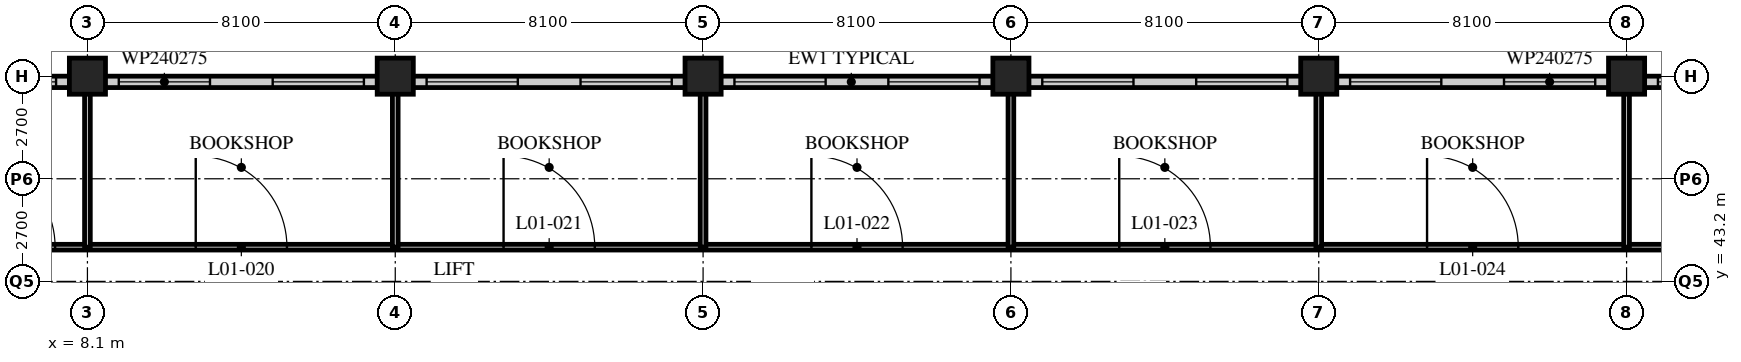
"""IFC4 building model, lengths in metres.
Left out: names, types, materials, properties, quantities, classifications, styles, units other than length and angle.
Written with IfcOpenShell. Run it as: python <this file> out.ifc"""

import sys

from ifc_helpers import new_model, si_unit, direction, frame, frame_2d, origin, origin_2d, place, context, subcontext, project, spatial, rectangle, hollow_rectangle, extrude, element, fill, save


model = new_model("IFC4")
c1 = context("Model", 3, precision=1e-05, world=origin(), true_north=direction((0.0, 1.0)))
c2 = subcontext(c1, "Body", "Model", "MODEL_VIEW")
j1 = project(units=[si_unit("LENGTHUNIT", "METRE"), si_unit("PLANEANGLEUNIT", "RADIAN")], contexts=[c1])
p1 = place(None, origin())
s1 = spatial("IfcSite", under=j1, at=p1, CompositionType="ELEMENT")
p2 = place(p1, origin())
s2 = spatial("IfcBuilding", under=s1, at=p2, CompositionType="ELEMENT")
p3 = place(p2, frame((0.0, 0.0, 6.0)))
s3 = spatial("IfcBuildingStorey", under=s2, at=p3, CompositionType="ELEMENT", Elevation=6.0)
for number, where, z_axis, x_axis in (
    (1, (8.1, 48.6, 0.0), (0.0, 0.0, 1.0), (1.0, 0.0, 0.0)),
    (2, (16.2, 48.6, 0.0), (0.0, 0.0, 1.0), (1.0, 0.0, 0.0)),
    (3, (24.3, 48.6, 0.0), (0.0, 0.0, 1.0), (1.0, 0.0, 0.0)),
    (4, (32.4, 48.6, 0.0), (0.0, 0.0, 1.0), (1.0, 0.0, 0.0)),
    (5, (40.5, 48.6, 0.0), (0.0, 0.0, 1.0), (1.0, 0.0, 0.0)),
    (6, (48.6, 48.6, 0.0), (0.0, 0.0, 1.0), (1.0, 0.0, 0.0)),
):
    element("IfcColumn", number, at=place(p3, frame(where, z_axis=z_axis, x_axis=x_axis)), inside=s3, PredefinedType="COLUMN", context=c2, shape_type="SweptSolid", body=[
        extrude(hollow_rectangle(XDim=0.95, YDim=0.95, WallThickness=0.1, at=origin_2d()), origin(), (0.0, 0.0, 1.0), 5.4),
    ])
p4 = place(p3, frame((64.5, 48.45, 0.0), z_axis=(0.0, 0.0, 1.0), x_axis=(-1.0, 0.0, 0.0)))
e7 = element("IfcWall", 7, at=p4, inside=s3, PredefinedType="SOLIDWALL", context=c2, shape_type="SweptSolid", body=[
    extrude(rectangle(XDim=72.6, YDim=0.3, at=frame_2d((36.3, 0.0))), origin(), (0.0, 0.0, 1.0), 5.15),
])
p5 = place(p4, frame((0.525, 0.0, 1.0)))
e8 = element("IfcOpeningElement", 8, at=p5, cuts=e7, PredefinedType="OPENING", context=c2, shape_type="SweptSolid", body=[
    extrude(rectangle(XDim=2.4, YDim=2.75, at=frame_2d((1.2, 1.375))), frame((0.0, 0.16, 0.0), z_axis=(0.0, -1.0, 0.0), x_axis=(1.0, 0.0, 0.0)), (0.0, 0.0, 1.0), 0.32),
])
p6 = place(p4, frame((4.575, 0.0, 1.0)))
e9 = element("IfcOpeningElement", 9, at=p6, cuts=e7, PredefinedType="OPENING", context=c2, shape_type="SweptSolid", body=[
    extrude(rectangle(XDim=2.4, YDim=2.75, at=frame_2d((1.2, 1.375))), frame((0.0, 0.16, 0.0), z_axis=(0.0, -1.0, 0.0), x_axis=(1.0, 0.0, 0.0)), (0.0, 0.0, 1.0), 0.32),
])
p7 = place(p4, frame((8.625, 0.0, 1.0)))
e10 = element("IfcOpeningElement", 10, at=p7, cuts=e7, PredefinedType="OPENING", context=c2, shape_type="SweptSolid", body=[
    extrude(rectangle(XDim=2.4, YDim=2.75, at=frame_2d((1.2, 1.375))), frame((0.0, 0.16, 0.0), z_axis=(0.0, -1.0, 0.0), x_axis=(1.0, 0.0, 0.0)), (0.0, 0.0, 1.0), 0.32),
])
p8 = place(p4, frame((12.675, 0.0, 1.0)))
e11 = element("IfcOpeningElement", 11, at=p8, cuts=e7, PredefinedType="OPENING", context=c2, shape_type="SweptSolid", body=[
    extrude(rectangle(XDim=2.4, YDim=2.75, at=frame_2d((1.2, 1.375))), frame((0.0, 0.16, 0.0), z_axis=(0.0, -1.0, 0.0), x_axis=(1.0, 0.0, 0.0)), (0.0, 0.0, 1.0), 0.32),
])
p9 = place(p4, frame((16.725, 0.0, 1.0)))
e12 = element("IfcOpeningElement", 12, at=p9, cuts=e7, PredefinedType="OPENING", context=c2, shape_type="SweptSolid", body=[
    extrude(rectangle(XDim=2.4, YDim=2.75, at=frame_2d((1.2, 1.375))), frame((0.0, 0.16, 0.0), z_axis=(0.0, -1.0, 0.0), x_axis=(1.0, 0.0, 0.0)), (0.0, 0.0, 1.0), 0.32),
])
p10 = place(p4, frame((20.775, 0.0, 1.0)))
e13 = element("IfcOpeningElement", 13, at=p10, cuts=e7, PredefinedType="OPENING", context=c2, shape_type="SweptSolid", body=[
    extrude(rectangle(XDim=2.4, YDim=2.75, at=frame_2d((1.2, 1.375))), frame((0.0, 0.16, 0.0), z_axis=(0.0, -1.0, 0.0), x_axis=(1.0, 0.0, 0.0)), (0.0, 0.0, 1.0), 0.32),
])
p11 = place(p4, frame((24.825, 0.0, 1.0)))
e14 = element("IfcOpeningElement", 14, at=p11, cuts=e7, PredefinedType="OPENING", context=c2, shape_type="SweptSolid", body=[
    extrude(rectangle(XDim=2.4, YDim=2.75, at=frame_2d((1.2, 1.375))), frame((0.0, 0.16, 0.0), z_axis=(0.0, -1.0, 0.0), x_axis=(1.0, 0.0, 0.0)), (0.0, 0.0, 1.0), 0.32),
])
p12 = place(p4, frame((28.875, 0.0, 1.0)))
e15 = element("IfcOpeningElement", 15, at=p12, cuts=e7, PredefinedType="OPENING", context=c2, shape_type="SweptSolid", body=[
    extrude(rectangle(XDim=2.4, YDim=2.75, at=frame_2d((1.2, 1.375))), frame((0.0, 0.16, 0.0), z_axis=(0.0, -1.0, 0.0), x_axis=(1.0, 0.0, 0.0)), (0.0, 0.0, 1.0), 0.32),
])
p13 = place(p4, frame((32.925, 0.0, 1.0)))
e16 = element("IfcOpeningElement", 16, at=p13, cuts=e7, PredefinedType="OPENING", context=c2, shape_type="SweptSolid", body=[
    extrude(rectangle(XDim=2.4, YDim=2.75, at=frame_2d((1.2, 1.375))), frame((0.0, 0.16, 0.0), z_axis=(0.0, -1.0, 0.0), x_axis=(1.0, 0.0, 0.0)), (0.0, 0.0, 1.0), 0.32),
])
p14 = place(p4, frame((36.975, 0.0, 1.0)))
e17 = element("IfcOpeningElement", 17, at=p14, cuts=e7, PredefinedType="OPENING", context=c2, shape_type="SweptSolid", body=[
    extrude(rectangle(XDim=2.4, YDim=2.75, at=frame_2d((1.2, 1.375))), frame((0.0, 0.16, 0.0), z_axis=(0.0, -1.0, 0.0), x_axis=(1.0, 0.0, 0.0)), (0.0, 0.0, 1.0), 0.32),
])
p15 = place(p4, frame((41.025, 0.0, 1.0)))
e18 = element("IfcOpeningElement", 18, at=p15, cuts=e7, PredefinedType="OPENING", context=c2, shape_type="SweptSolid", body=[
    extrude(rectangle(XDim=2.4, YDim=2.75, at=frame_2d((1.2, 1.375))), frame((0.0, 0.16, 0.0), z_axis=(0.0, -1.0, 0.0), x_axis=(1.0, 0.0, 0.0)), (0.0, 0.0, 1.0), 0.32),
])
p16 = place(p4, frame((45.075, 0.0, 1.0)))
e19 = element("IfcOpeningElement", 19, at=p16, cuts=e7, PredefinedType="OPENING", context=c2, shape_type="SweptSolid", body=[
    extrude(rectangle(XDim=2.4, YDim=2.75, at=frame_2d((1.2, 1.375))), frame((0.0, 0.16, 0.0), z_axis=(0.0, -1.0, 0.0), x_axis=(1.0, 0.0, 0.0)), (0.0, 0.0, 1.0), 0.32),
])
p17 = place(p4, frame((49.125, 0.0, 1.0)))
e20 = element("IfcOpeningElement", 20, at=p17, cuts=e7, PredefinedType="OPENING", context=c2, shape_type="SweptSolid", body=[
    extrude(rectangle(XDim=2.4, YDim=2.75, at=frame_2d((1.2, 1.375))), frame((0.0, 0.16, 0.0), z_axis=(0.0, -1.0, 0.0), x_axis=(1.0, 0.0, 0.0)), (0.0, 0.0, 1.0), 0.32),
])
p18 = place(p4, frame((53.175, 0.0, 1.0)))
e21 = element("IfcOpeningElement", 21, at=p18, cuts=e7, PredefinedType="OPENING", context=c2, shape_type="SweptSolid", body=[
    extrude(rectangle(XDim=2.4, YDim=2.75, at=frame_2d((1.2, 1.375))), frame((0.0, 0.16, 0.0), z_axis=(0.0, -1.0, 0.0), x_axis=(1.0, 0.0, 0.0)), (0.0, 0.0, 1.0), 0.32),
])
p19 = place(p4, frame((57.225, 0.0, 1.0)))
e22 = element("IfcOpeningElement", 22, at=p19, cuts=e7, PredefinedType="OPENING", context=c2, shape_type="SweptSolid", body=[
    extrude(rectangle(XDim=2.4, YDim=2.75, at=frame_2d((1.2, 1.375))), frame((0.0, 0.16, 0.0), z_axis=(0.0, -1.0, 0.0), x_axis=(1.0, 0.0, 0.0)), (0.0, 0.0, 1.0), 0.32),
])
p20 = place(p4, frame((61.275, 0.0, 1.0)))
e23 = element("IfcOpeningElement", 23, at=p20, cuts=e7, PredefinedType="OPENING", context=c2, shape_type="SweptSolid", body=[
    extrude(rectangle(XDim=2.4, YDim=2.75, at=frame_2d((1.2, 1.375))), frame((0.0, 0.16, 0.0), z_axis=(0.0, -1.0, 0.0), x_axis=(1.0, 0.0, 0.0)), (0.0, 0.0, 1.0), 0.32),
])
p21 = place(p4, frame((65.325, 0.0, 1.0)))
e24 = element("IfcOpeningElement", 24, at=p21, cuts=e7, PredefinedType="OPENING", context=c2, shape_type="SweptSolid", body=[
    extrude(rectangle(XDim=2.4, YDim=2.75, at=frame_2d((1.2, 1.375))), frame((0.0, 0.16, 0.0), z_axis=(0.0, -1.0, 0.0), x_axis=(1.0, 0.0, 0.0)), (0.0, 0.0, 1.0), 0.32),
])
p22 = place(p4, frame((69.375, 0.0, 1.0)))
e25 = element("IfcOpeningElement", 25, at=p22, cuts=e7, PredefinedType="OPENING", context=c2, shape_type="SweptSolid", body=[
    extrude(rectangle(XDim=2.4, YDim=2.75, at=frame_2d((1.2, 1.375))), frame((0.0, 0.16, 0.0), z_axis=(0.0, -1.0, 0.0), x_axis=(1.0, 0.0, 0.0)), (0.0, 0.0, 1.0), 0.32),
])
p23 = place(p3, frame((0.0, 44.1, 0.0), z_axis=(0.0, 0.0, 1.0), x_axis=(1.0, 0.0, 0.0)))
e26 = element("IfcWall", 26, at=p23, inside=s3, PredefinedType="PARTITIONING", context=c2, shape_type="SweptSolid", body=[
    extrude(rectangle(XDim=56.7, YDim=0.15, at=frame_2d((28.35, 0.0))), origin(), (0.0, 0.0, 1.0), 5.15),
])
p24 = place(p23, frame((10.95, 0.0, 0.0)))
e27 = element("IfcOpeningElement", 27, at=p24, cuts=e26, PredefinedType="OPENING", context=c2, shape_type="SweptSolid", body=[
    extrude(rectangle(XDim=2.4, YDim=2.7, at=frame_2d((1.2, 1.35))), frame((0.0, 0.085, 0.0), z_axis=(0.0, -1.0, 0.0), x_axis=(1.0, 0.0, 0.0)), (0.0, 0.0, 1.0), 0.17),
])
p25 = place(p23, frame((19.05, 0.0, 0.0)))
e28 = element("IfcOpeningElement", 28, at=p25, cuts=e26, PredefinedType="OPENING", context=c2, shape_type="SweptSolid", body=[
    extrude(rectangle(XDim=2.4, YDim=2.7, at=frame_2d((1.2, 1.35))), frame((0.0, 0.085, 0.0), z_axis=(0.0, -1.0, 0.0), x_axis=(1.0, 0.0, 0.0)), (0.0, 0.0, 1.0), 0.17),
])
p26 = place(p23, frame((27.15, 0.0, 0.0)))
e29 = element("IfcOpeningElement", 29, at=p26, cuts=e26, PredefinedType="OPENING", context=c2, shape_type="SweptSolid", body=[
    extrude(rectangle(XDim=2.4, YDim=2.7, at=frame_2d((1.2, 1.35))), frame((0.0, 0.085, 0.0), z_axis=(0.0, -1.0, 0.0), x_axis=(1.0, 0.0, 0.0)), (0.0, 0.0, 1.0), 0.17),
])
p27 = place(p23, frame((35.25, 0.0, 0.0)))
e30 = element("IfcOpeningElement", 30, at=p27, cuts=e26, PredefinedType="OPENING", context=c2, shape_type="SweptSolid", body=[
    extrude(rectangle(XDim=2.4, YDim=2.7, at=frame_2d((1.2, 1.35))), frame((0.0, 0.085, 0.0), z_axis=(0.0, -1.0, 0.0), x_axis=(1.0, 0.0, 0.0)), (0.0, 0.0, 1.0), 0.17),
])
p28 = place(p23, frame((43.35, 0.0, 0.0)))
e31 = element("IfcOpeningElement", 31, at=p28, cuts=e26, PredefinedType="OPENING", context=c2, shape_type="SweptSolid", body=[
    extrude(rectangle(XDim=2.4, YDim=2.7, at=frame_2d((1.2, 1.35))), frame((0.0, 0.085, 0.0), z_axis=(0.0, -1.0, 0.0), x_axis=(1.0, 0.0, 0.0)), (0.0, 0.0, 1.0), 0.17),
])
p29 = place(p23, frame((53.45, 0.0, 0.0)))
e32 = element("IfcOpeningElement", 32, at=p29, cuts=e26, PredefinedType="OPENING", context=c2, shape_type="SweptSolid", body=[
    extrude(rectangle(XDim=2.4, YDim=2.7, at=frame_2d((1.2, 1.35))), frame((0.0, 0.085, 0.0), z_axis=(0.0, -1.0, 0.0), x_axis=(1.0, 0.0, 0.0)), (0.0, 0.0, 1.0), 0.17),
])
p30 = place(p23, frame((4.85, 0.0, 0.0)))
e33 = element("IfcOpeningElement", 33, at=p30, cuts=e26, PredefinedType="OPENING", context=c2, shape_type="SweptSolid", body=[
    extrude(rectangle(XDim=2.4, YDim=2.7, at=frame_2d((1.2, 1.35))), frame((0.0, 0.085, 0.0), z_axis=(0.0, -1.0, 0.0), x_axis=(1.0, 0.0, 0.0)), (0.0, 0.0, 1.0), 0.17),
])
for number, where, z_axis, x_axis in (
    (34, (16.2, 44.1, 0.0), (0.0, 0.0, 1.0), (0.0, 1.0, 0.0)),
    (35, (24.3, 44.1, 0.0), (0.0, 0.0, 1.0), (0.0, 1.0, 0.0)),
    (36, (32.4, 44.1, 0.0), (0.0, 0.0, 1.0), (0.0, 1.0, 0.0)),
    (37, (40.5, 44.1, 0.0), (0.0, 0.0, 1.0), (0.0, 1.0, 0.0)),
    (38, (48.6, 44.1, 0.0), (0.0, 0.0, 1.0), (0.0, 1.0, 0.0)),
    (39, (8.1, 44.1, 0.0), (0.0, 0.0, 1.0), (0.0, 1.0, 0.0)),
):
    element("IfcWall", number, at=place(p3, frame(where, z_axis=z_axis, x_axis=x_axis)), inside=s3, PredefinedType="PARTITIONING", context=c2, shape_type="SweptSolid", body=[
        extrude(rectangle(XDim=4.2, YDim=0.15, at=frame_2d((2.1, 0.0))), origin(), (0.0, 0.0, 1.0), 4.538),
    ])
p31 = place(p8, origin())
e40 = element("IfcWindow", 40, at=p31, inside=s3, PartitioningType="SINGLE_PANEL", PredefinedType="WINDOW", context=c2, shape_type="SweptSolid", body=[
    extrude(rectangle(XDim=2.4, YDim=2.75, at=frame_2d((1.2, 1.375))), frame((0.0, 0.03, 0.0), z_axis=(0.0, -1.0, 0.0), x_axis=(1.0, 0.0, 0.0)), (0.0, 0.0, 1.0), 0.06),
])
fill(e11, e40)
p32 = place(p9, origin())
e41 = element("IfcWindow", 41, at=p32, inside=s3, PartitioningType="SINGLE_PANEL", PredefinedType="WINDOW", context=c2, shape_type="SweptSolid", body=[
    extrude(rectangle(XDim=2.4, YDim=2.75, at=frame_2d((1.2, 1.375))), frame((0.0, 0.03, 0.0), z_axis=(0.0, -1.0, 0.0), x_axis=(1.0, 0.0, 0.0)), (0.0, 0.0, 1.0), 0.06),
])
fill(e12, e41)
p33 = place(p10, origin())
e42 = element("IfcWindow", 42, at=p33, inside=s3, PartitioningType="SINGLE_PANEL", PredefinedType="WINDOW", context=c2, shape_type="SweptSolid", body=[
    extrude(rectangle(XDim=2.4, YDim=2.75, at=frame_2d((1.2, 1.375))), frame((0.0, 0.03, 0.0), z_axis=(0.0, -1.0, 0.0), x_axis=(1.0, 0.0, 0.0)), (0.0, 0.0, 1.0), 0.06),
])
fill(e13, e42)
p34 = place(p11, origin())
e43 = element("IfcWindow", 43, at=p34, inside=s3, PartitioningType="SINGLE_PANEL", PredefinedType="WINDOW", context=c2, shape_type="SweptSolid", body=[
    extrude(rectangle(XDim=2.4, YDim=2.75, at=frame_2d((1.2, 1.375))), frame((0.0, 0.03, 0.0), z_axis=(0.0, -1.0, 0.0), x_axis=(1.0, 0.0, 0.0)), (0.0, 0.0, 1.0), 0.06),
])
fill(e14, e43)
p35 = place(p12, origin())
e44 = element("IfcWindow", 44, at=p35, inside=s3, PartitioningType="SINGLE_PANEL", PredefinedType="WINDOW", context=c2, shape_type="SweptSolid", body=[
    extrude(rectangle(XDim=2.4, YDim=2.75, at=frame_2d((1.2, 1.375))), frame((0.0, 0.03, 0.0), z_axis=(0.0, -1.0, 0.0), x_axis=(1.0, 0.0, 0.0)), (0.0, 0.0, 1.0), 0.06),
])
fill(e15, e44)
p36 = place(p13, origin())
e45 = element("IfcWindow", 45, at=p36, inside=s3, PartitioningType="SINGLE_PANEL", PredefinedType="WINDOW", context=c2, shape_type="SweptSolid", body=[
    extrude(rectangle(XDim=2.4, YDim=2.75, at=frame_2d((1.2, 1.375))), frame((0.0, 0.03, 0.0), z_axis=(0.0, -1.0, 0.0), x_axis=(1.0, 0.0, 0.0)), (0.0, 0.0, 1.0), 0.06),
])
fill(e16, e45)
p37 = place(p14, origin())
e46 = element("IfcWindow", 46, at=p37, inside=s3, PartitioningType="SINGLE_PANEL", PredefinedType="WINDOW", context=c2, shape_type="SweptSolid", body=[
    extrude(rectangle(XDim=2.4, YDim=2.75, at=frame_2d((1.2, 1.375))), frame((0.0, 0.03, 0.0), z_axis=(0.0, -1.0, 0.0), x_axis=(1.0, 0.0, 0.0)), (0.0, 0.0, 1.0), 0.06),
])
fill(e17, e46)
p38 = place(p15, origin())
e47 = element("IfcWindow", 47, at=p38, inside=s3, PartitioningType="SINGLE_PANEL", PredefinedType="WINDOW", context=c2, shape_type="SweptSolid", body=[
    extrude(rectangle(XDim=2.4, YDim=2.75, at=frame_2d((1.2, 1.375))), frame((0.0, 0.03, 0.0), z_axis=(0.0, -1.0, 0.0), x_axis=(1.0, 0.0, 0.0)), (0.0, 0.0, 1.0), 0.06),
])
fill(e18, e47)
p39 = place(p16, origin())
e48 = element("IfcWindow", 48, at=p39, inside=s3, PartitioningType="SINGLE_PANEL", PredefinedType="WINDOW", context=c2, shape_type="SweptSolid", body=[
    extrude(rectangle(XDim=2.4, YDim=2.75, at=frame_2d((1.2, 1.375))), frame((0.0, 0.03, 0.0), z_axis=(0.0, -1.0, 0.0), x_axis=(1.0, 0.0, 0.0)), (0.0, 0.0, 1.0), 0.06),
])
fill(e19, e48)
p40 = place(p17, origin())
e49 = element("IfcWindow", 49, at=p40, inside=s3, PartitioningType="SINGLE_PANEL", PredefinedType="WINDOW", context=c2, shape_type="SweptSolid", body=[
    extrude(rectangle(XDim=2.4, YDim=2.75, at=frame_2d((1.2, 1.375))), frame((0.0, 0.03, 0.0), z_axis=(0.0, -1.0, 0.0), x_axis=(1.0, 0.0, 0.0)), (0.0, 0.0, 1.0), 0.06),
])
fill(e20, e49)
p41 = place(p18, origin())
e50 = element("IfcWindow", 50, at=p41, inside=s3, PartitioningType="SINGLE_PANEL", PredefinedType="WINDOW", context=c2, shape_type="SweptSolid", body=[
    extrude(rectangle(XDim=2.4, YDim=2.75, at=frame_2d((1.2, 1.375))), frame((0.0, 0.03, 0.0), z_axis=(0.0, -1.0, 0.0), x_axis=(1.0, 0.0, 0.0)), (0.0, 0.0, 1.0), 0.06),
])
fill(e21, e50)
p42 = place(p19, origin())
e51 = element("IfcWindow", 51, at=p42, inside=s3, PartitioningType="SINGLE_PANEL", PredefinedType="WINDOW", context=c2, shape_type="SweptSolid", body=[
    extrude(rectangle(XDim=2.4, YDim=2.75, at=frame_2d((1.2, 1.375))), frame((0.0, 0.03, 0.0), z_axis=(0.0, -1.0, 0.0), x_axis=(1.0, 0.0, 0.0)), (0.0, 0.0, 1.0), 0.06),
])
fill(e22, e51)
p43 = place(p24, origin())
e52 = element("IfcDoor", 52, at=p43, inside=s3, OperationType="DOUBLE_DOOR_SINGLE_SWING", PredefinedType="DOOR", context=c2, shape_type="SweptSolid", body=[
    extrude(rectangle(XDim=2.4, YDim=2.7, at=frame_2d((1.2, 1.35))), frame((0.0, 0.025, 0.0), z_axis=(0.0, -1.0, 0.0), x_axis=(1.0, 0.0, 0.0)), (0.0, 0.0, 1.0), 0.05),
])
fill(e27, e52)
p44 = place(p25, origin())
e53 = element("IfcDoor", 53, at=p44, inside=s3, OperationType="DOUBLE_DOOR_SINGLE_SWING", PredefinedType="DOOR", context=c2, shape_type="SweptSolid", body=[
    extrude(rectangle(XDim=2.4, YDim=2.7, at=frame_2d((1.2, 1.35))), frame((0.0, 0.025, 0.0), z_axis=(0.0, -1.0, 0.0), x_axis=(1.0, 0.0, 0.0)), (0.0, 0.0, 1.0), 0.05),
])
fill(e28, e53)
p45 = place(p26, origin())
e54 = element("IfcDoor", 54, at=p45, inside=s3, OperationType="DOUBLE_DOOR_SINGLE_SWING", PredefinedType="DOOR", context=c2, shape_type="SweptSolid", body=[
    extrude(rectangle(XDim=2.4, YDim=2.7, at=frame_2d((1.2, 1.35))), frame((0.0, 0.025, 0.0), z_axis=(0.0, -1.0, 0.0), x_axis=(1.0, 0.0, 0.0)), (0.0, 0.0, 1.0), 0.05),
])
fill(e29, e54)
p46 = place(p27, origin())
e55 = element("IfcDoor", 55, at=p46, inside=s3, OperationType="DOUBLE_DOOR_SINGLE_SWING", PredefinedType="DOOR", context=c2, shape_type="SweptSolid", body=[
    extrude(rectangle(XDim=2.4, YDim=2.7, at=frame_2d((1.2, 1.35))), frame((0.0, 0.025, 0.0), z_axis=(0.0, -1.0, 0.0), x_axis=(1.0, 0.0, 0.0)), (0.0, 0.0, 1.0), 0.05),
])
fill(e30, e55)
p47 = place(p28, origin())
e56 = element("IfcDoor", 56, at=p47, inside=s3, OperationType="DOUBLE_DOOR_SINGLE_SWING", PredefinedType="DOOR", context=c2, shape_type="SweptSolid", body=[
    extrude(rectangle(XDim=2.4, YDim=2.7, at=frame_2d((1.2, 1.35))), frame((0.0, 0.025, 0.0), z_axis=(0.0, -1.0, 0.0), x_axis=(1.0, 0.0, 0.0)), (0.0, 0.0, 1.0), 0.05),
])
fill(e31, e56)
p48 = place(p30, origin())
e57 = element("IfcDoor", 57, at=p48, inside=s3, OperationType="DOUBLE_DOOR_SINGLE_SWING", PredefinedType="DOOR", context=c2, shape_type="SweptSolid", body=[
    extrude(rectangle(XDim=2.4, YDim=2.7, at=frame_2d((1.2, 1.35))), frame((0.0, 0.025, 0.0), z_axis=(0.0, -1.0, 0.0), x_axis=(1.0, 0.0, 0.0)), (0.0, 0.0, 1.0), 0.05),
])
fill(e33, e57)
save(model, sys.argv[1])
